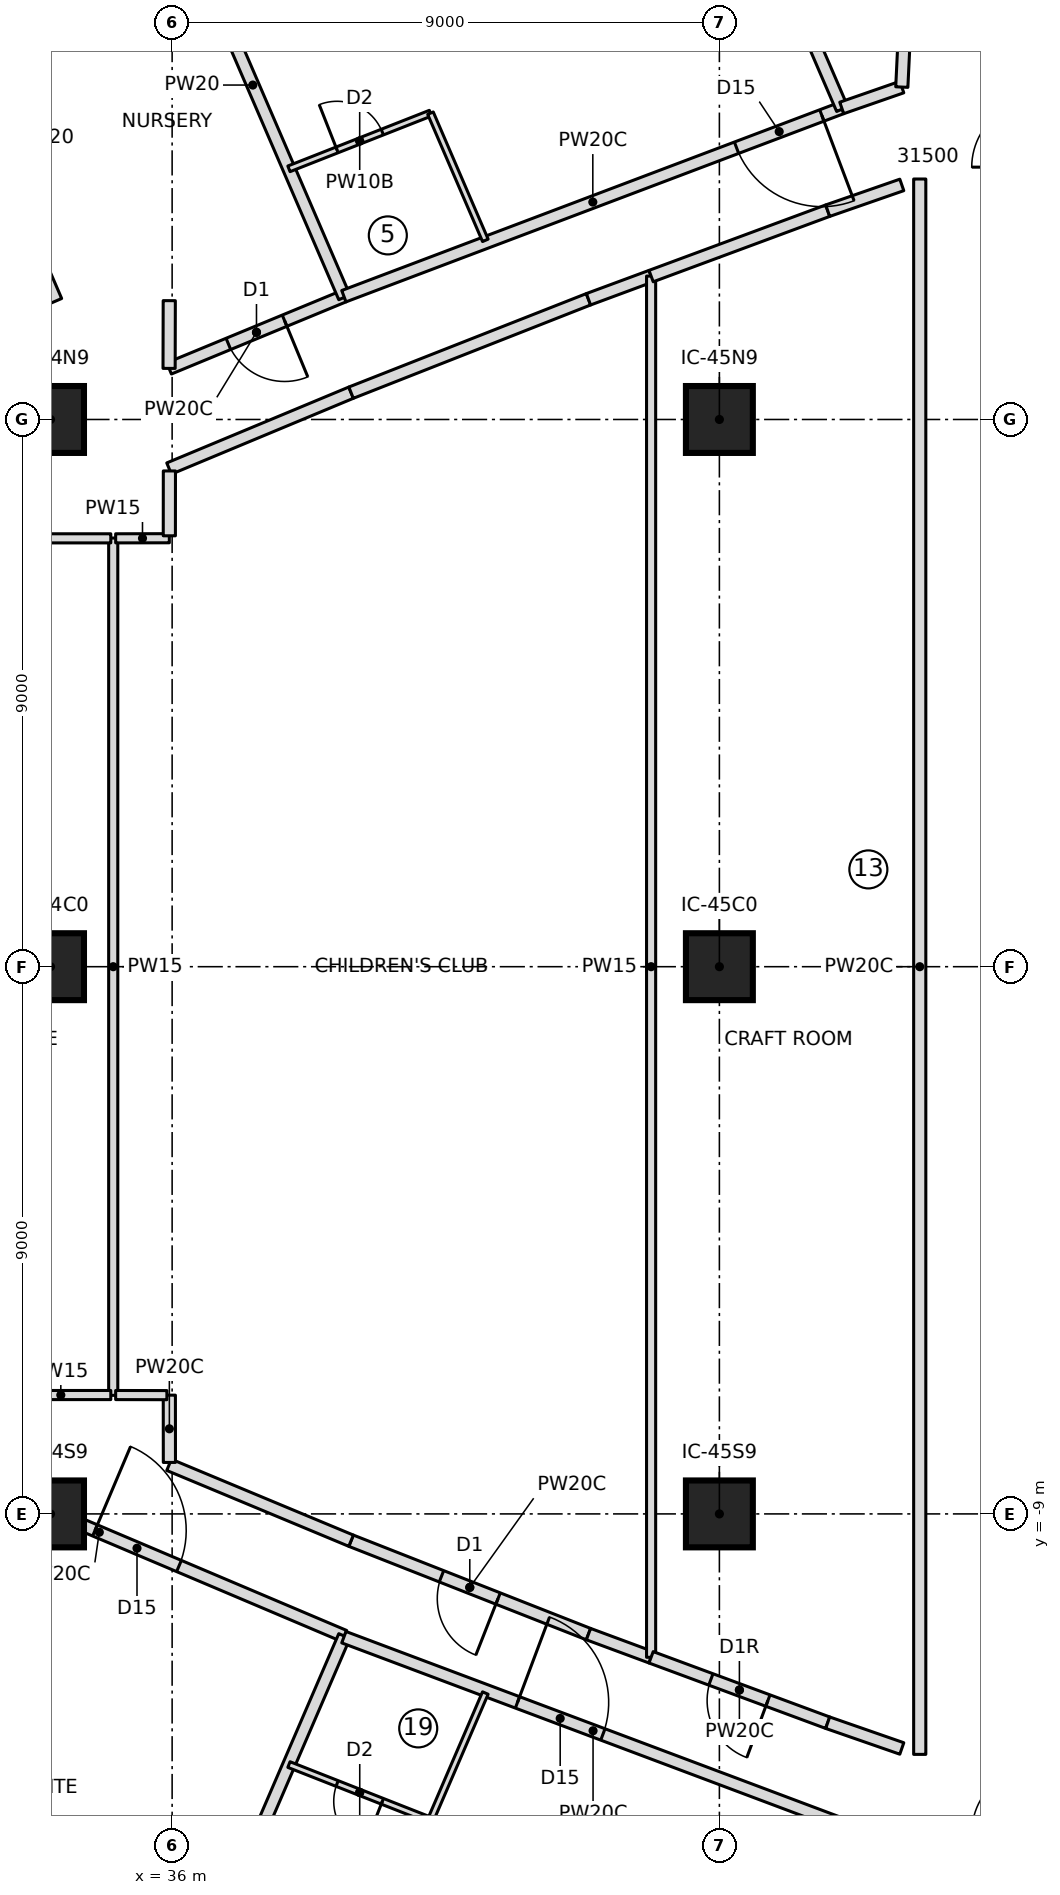
"""IFC4 building model, lengths in metres.
Left out: names, types, materials, properties, quantities, classifications, styles, units other than length and angle.
Written with IfcOpenShell. Run it as: python <this file> out.ifc"""

import sys

from ifc_helpers import new_model, si_unit, direction, frame, frame_2d, origin, origin_2d, place, context, subcontext, project, spatial, rectangle, extrude, element, fill, save


model = new_model("IFC4")
c1 = context("Model", 3, precision=1e-05, world=origin(), true_north=direction((0.0, 1.0)))
c2 = subcontext(c1, "Body", "Model", "MODEL_VIEW")
j1 = project(units=[si_unit("LENGTHUNIT", "METRE"), si_unit("PLANEANGLEUNIT", "RADIAN")], contexts=[c1])
p1 = place(None, origin())
s1 = spatial("IfcSite", under=j1, at=p1, CompositionType="ELEMENT")
p2 = place(p1, origin())
s2 = spatial("IfcBuilding", under=s1, at=p2, CompositionType="ELEMENT")
p3 = place(p2, frame((0.0, 0.0, 155.05)))
s3 = spatial("IfcBuildingStorey", under=s2, at=p3, CompositionType="ELEMENT", Elevation=155.05)
for number, where, z_axis, x_axis in (
    (1, (34.0, -9.0, 0.0), (0.0, 0.0, 1.0), (1.0, 0.0, 0.0)),
    (2, (34.0, 0.0, 0.0), (0.0, 0.0, 1.0), (1.0, 0.0, 0.0)),
    (3, (34.0, 9.0, 0.0), (0.0, 0.0, 1.0), (1.0, 0.0, 0.0)),
    (4, (45.0, -9.0, 0.0), (0.0, 0.0, 1.0), (1.0, 0.0, 0.0)),
    (5, (45.0, 0.0, 0.0), (0.0, 0.0, 1.0), (1.0, 0.0, 0.0)),
    (6, (45.0, 9.0, 0.0), (0.0, 0.0, 1.0), (1.0, 0.0, 0.0)),
):
    element("IfcColumn", number, at=place(p3, frame(where, z_axis=z_axis, x_axis=x_axis)), inside=s3, PredefinedType="COLUMN", context=c2, shape_type="SweptSolid", body=[
        extrude(rectangle(XDim=1.1, YDim=1.1, at=origin_2d()), origin(), (0.0, 0.0, 1.0), 3.55),
    ])
p4 = place(p3, frame((34.092, 10.95, 0.0), z_axis=(0.0, 0.0, 1.0), x_axis=(-0.395991607501, 0.918254129742, 0.0)))
e7 = element("IfcWall", 7, at=p4, inside=s3, PredefinedType="PARTITIONING", context=c2, shape_type="SweptSolid", body=[
    extrude(rectangle(XDim=5.841, YDim=0.2, at=frame_2d((2.92, 0.0))), origin(), (0.0, 0.0, 1.0), 3.25),
])
p5 = place(p3, frame((38.824, 11.028, 0.0), z_axis=(0.0, 0.0, 1.0), x_axis=(-0.924238544028, -0.381815549359, 0.0)))
e8 = element("IfcWall", 8, at=p5, inside=s3, PredefinedType="PARTITIONING", context=c2, shape_type="SweptSolid", body=[
    extrude(rectangle(XDim=3.11, YDim=0.2, at=frame_2d((1.555, 0.0))), origin(), (0.0, 0.0, 1.0), 3.25),
])
p6 = place(p5, frame((1.055, 0.0, 0.0)))
e9 = element("IfcOpeningElement", 9, at=p6, cuts=e8, PredefinedType="OPENING", context=c2, shape_type="SweptSolid", body=[
    extrude(rectangle(XDim=1.0, YDim=2.1, at=frame_2d((0.5, 1.05))), frame((0.0, 0.11, 0.0), z_axis=(0.0, -1.0, 0.0), x_axis=(1.0, 0.0, 0.0)), (0.0, 0.0, 1.0), 0.22),
])
p7 = place(p3, frame((38.832, 11.009, 0.0), z_axis=(0.0, 0.0, 1.0), x_axis=(-0.395987603644, 0.918255856371, 0.0)))
e10 = element("IfcWall", 10, at=p7, inside=s3, PredefinedType="PARTITIONING", context=c2, shape_type="SweptSolid", body=[
    extrude(rectangle(XDim=7.604, YDim=0.2, at=frame_2d((3.802, 0.0))), origin(), (0.0, 0.0, 1.0), 3.25),
])
p8 = place(p3, frame((47.012, 14.124, 0.0), z_axis=(0.0, 0.0, 1.0), x_axis=(-0.935360585256, -0.353695597299, 0.0)))
e11 = element("IfcWall", 11, at=p8, inside=s3, PredefinedType="PARTITIONING", context=c2, shape_type="SweptSolid", body=[
    extrude(rectangle(XDim=8.754, YDim=0.2, at=frame_2d((4.377, 0.0))), origin(), (0.0, 0.0, 1.0), 3.25),
])
p9 = place(p8, frame((0.35, 0.0, 0.0)))
e12 = element("IfcOpeningElement", 12, at=p9, cuts=e11, PredefinedType="OPENING", context=c2, shape_type="SweptSolid", body=[
    extrude(rectangle(XDim=1.5, YDim=2.1, at=frame_2d((0.75, 1.05))), frame((0.0, 0.11, 0.0), z_axis=(0.0, -1.0, 0.0), x_axis=(1.0, 0.0, 0.0)), (0.0, 0.0, 1.0), 0.22),
])
p10 = place(p3, frame((37.921, 13.122, 0.0), z_axis=(0.0, 0.0, 1.0), x_axis=(0.930555592459, 0.366150637503, 0.0)))
e13 = element("IfcWall", 13, at=p10, inside=s3, PredefinedType="PARTITIONING", context=c2, shape_type="SweptSolid", body=[
    extrude(rectangle(XDim=2.501, YDim=0.1, at=frame_2d((1.25, 0.0))), origin(), (0.0, 0.0, 1.0), 3.25),
])
p11 = place(p10, frame((0.85, 0.0, 0.0)))
e14 = element("IfcOpeningElement", 14, at=p11, cuts=e13, PredefinedType="OPENING", context=c2, shape_type="SweptSolid", body=[
    extrude(rectangle(XDim=0.8, YDim=2.1, at=frame_2d((0.4, 1.05))), frame((0.0, 0.06, 0.0), z_axis=(0.0, -1.0, 0.0), x_axis=(1.0, 0.0, 0.0)), (0.0, 0.0, 1.0), 0.12),
])
p12 = place(p3, frame((40.249, 14.038, 0.0), z_axis=(0.0, 0.0, 1.0), x_axis=(0.39596178423, -0.918266990275, 0.0)))
e15 = element("IfcWall", 15, at=p12, inside=s3, PredefinedType="PARTITIONING", context=c2, shape_type="SweptSolid", body=[
    extrude(rectangle(XDim=2.278, YDim=0.1, at=frame_2d((1.139, 0.0))), origin(), (0.0, 0.0, 1.0), 3.25),
])
p13 = place(p3, frame((47.021, 14.105, 0.0), z_axis=(0.0, 0.0, 1.0), x_axis=(-0.39600636385, 0.918247766014, 0.0)))
e16 = element("IfcWall", 16, at=p13, inside=s3, PredefinedType="PARTITIONING", context=c2, shape_type="SweptSolid", body=[
    extrude(rectangle(XDim=7.62, YDim=0.2, at=frame_2d((3.81, 0.0))), origin(), (0.0, 0.0, 1.0), 3.25),
])
p14 = place(p3, frame((30.772, -7.594, 0.0), z_axis=(0.0, 0.0, 1.0), x_axis=(0.920747305421, -0.390159454019, 0.0)))
e17 = element("IfcWall", 17, at=p14, inside=s3, PredefinedType="PARTITIONING", context=c2, shape_type="SweptSolid", body=[
    extrude(rectangle(XDim=8.754, YDim=0.2, at=frame_2d((4.377, 0.0))), origin(), (0.0, 0.0, 1.0), 3.25),
])
p15 = place(p14, frame((4.3, 0.0, 0.0)))
e18 = element("IfcOpeningElement", 18, at=p15, cuts=e17, PredefinedType="OPENING", context=c2, shape_type="SweptSolid", body=[
    extrude(rectangle(XDim=1.5, YDim=2.1, at=frame_2d((0.75, 1.05))), frame((0.0, 0.11, 0.0), z_axis=(0.0, -1.0, 0.0), x_axis=(1.0, 0.0, 0.0)), (0.0, 0.0, 1.0), 0.22),
])
p16 = place(p3, frame((35.821, -17.991, 0.0), z_axis=(0.0, 0.0, 1.0), x_axis=(0.395987603644, 0.918255856371, 0.0)))
e19 = element("IfcWall", 19, at=p16, inside=s3, PredefinedType="PARTITIONING", context=c2, shape_type="SweptSolid", body=[
    extrude(rectangle(XDim=7.604, YDim=0.2, at=frame_2d((3.802, 0.0))), origin(), (0.0, 0.0, 1.0), 3.25),
])
p17 = place(p3, frame((38.824, -11.028, 0.0), z_axis=(0.0, 0.0, 1.0), x_axis=(0.936174374451, -0.351535973439, 0.0)))
e20 = element("IfcWall", 20, at=p17, inside=s3, PredefinedType="PARTITIONING", context=c2, shape_type="SweptSolid", body=[
    extrude(rectangle(XDim=8.755, YDim=0.2, at=frame_2d((4.377, 0.0))), origin(), (0.0, 0.0, 1.0), 3.25),
])
p18 = place(p17, frame((3.05, 0.0, 0.0)))
e21 = element("IfcOpeningElement", 21, at=p18, cuts=e20, PredefinedType="OPENING", context=c2, shape_type="SweptSolid", body=[
    extrude(rectangle(XDim=1.5, YDim=2.1, at=frame_2d((0.75, 1.05))), frame((0.0, 0.11, 0.0), z_axis=(0.0, -1.0, 0.0), x_axis=(1.0, 0.0, 0.0)), (0.0, 0.0, 1.0), 0.22),
])
p19 = place(p3, frame((41.151, -11.946, 0.0), z_axis=(0.0, 0.0, 1.0), x_axis=(-0.39596178423, -0.918266990275, 0.0)))
e22 = element("IfcWall", 22, at=p19, inside=s3, PredefinedType="PARTITIONING", context=c2, shape_type="SweptSolid", body=[
    extrude(rectangle(XDim=2.278, YDim=0.1, at=frame_2d((1.139, 0.0))), origin(), (0.0, 0.0, 1.0), 3.25),
])
p20 = place(p3, frame((40.249, -14.038, 0.0), z_axis=(0.0, 0.0, 1.0), x_axis=(-0.930555592459, 0.366150637503, 0.0)))
e23 = element("IfcWall", 23, at=p20, inside=s3, PredefinedType="PARTITIONING", context=c2, shape_type="SweptSolid", body=[
    extrude(rectangle(XDim=2.501, YDim=0.1, at=frame_2d((1.25, 0.0))), origin(), (0.0, 0.0, 1.0), 3.25),
])
p21 = place(p20, frame((0.85, 0.0, 0.0)))
e24 = element("IfcOpeningElement", 24, at=p21, cuts=e23, PredefinedType="OPENING", context=c2, shape_type="SweptSolid", body=[
    extrude(rectangle(XDim=0.8, YDim=2.1, at=frame_2d((0.4, 1.05))), frame((0.0, 0.06, 0.0), z_axis=(0.0, -1.0, 0.0), x_axis=(1.0, 0.0, 0.0)), (0.0, 0.0, 1.0), 0.12),
])
p22 = place(p3, frame((35.031, -7.05, 0.0), z_axis=(0.0, 0.0, 1.0), x_axis=(0.0, 1.0, 0.0)))
e25 = element("IfcWall", 25, at=p22, inside=s3, PredefinedType="PARTITIONING", context=c2, shape_type="SweptSolid", body=[
    extrude(rectangle(XDim=14.1, YDim=0.15, at=frame_2d((7.05, 0.0))), origin(), (0.0, 0.0, 1.0), 3.25),
])
p23 = place(p3, frame((42.847, -10.977, 0.0), z_axis=(0.0, 0.0, 1.0), x_axis=(-0.930576677263, 0.36609704688, 0.0)))
e26 = element("IfcWall", 26, at=p23, inside=s3, PredefinedType="PARTITIONING", context=c2, shape_type="SweptSolid", body=[
    extrude(rectangle(XDim=4.195, YDim=0.2, at=frame_2d((2.098, 0.0))), origin(), (0.0, 0.0, 1.0), 3.25),
])
p24 = place(p23, frame((1.598, 0.0, 0.0)))
e27 = element("IfcOpeningElement", 27, at=p24, cuts=e26, PredefinedType="OPENING", context=c2, shape_type="SweptSolid", body=[
    extrude(rectangle(XDim=1.0, YDim=2.1, at=frame_2d((0.5, 1.05))), frame((0.0, 0.11, 0.0), z_axis=(0.0, -1.0, 0.0), x_axis=(1.0, 0.0, 0.0)), (0.0, 0.0, 1.0), 0.22),
])
p25 = place(p3, frame((35.95, 8.193, 0.0), z_axis=(0.0, 0.0, 1.0), x_axis=(0.923005630596, 0.384786441923, 0.0)))
e28 = element("IfcWall", 28, at=p25, inside=s3, PredefinedType="PARTITIONING", context=c2, shape_type="SweptSolid", body=[
    extrude(rectangle(XDim=3.243, YDim=0.2, at=frame_2d((1.622, 0.0))), origin(), (0.0, 0.0, 1.0), 3.25),
])
p26 = place(p3, frame((38.943, 9.441, 0.0), z_axis=(0.0, 0.0, 1.0), x_axis=(0.930576677263, 0.36609704688, 0.0)))
e29 = element("IfcWall", 29, at=p26, inside=s3, PredefinedType="PARTITIONING", context=c2, shape_type="SweptSolid", body=[
    extrude(rectangle(XDim=4.195, YDim=0.2, at=frame_2d((2.098, 0.0))), origin(), (0.0, 0.0, 1.0), 3.25),
])
for number, where, z_axis, x_axis in (
    (30, (42.847, 10.977, 0.0), (0.0, 0.0, 1.0), (0.938, 0.347, 0.0)),
    (31, (43.877, -11.358, 0.0), (0.0, 0.0, 1.0), (-0.938, 0.347, 0.0)),
):
    element("IfcWall", number, at=place(p3, frame(where, z_axis=z_axis, x_axis=x_axis)), inside=s3, PredefinedType="PARTITIONING", context=c2, shape_type="SweptSolid", body=[
        extrude(rectangle(XDim=1.098, YDim=0.2, at=frame_2d((0.549, 0.0))), origin(), (0.0, 0.0, 1.0), 3.25),
    ])
p27 = place(p3, frame((38.943, -9.441, 0.0), z_axis=(0.0, 0.0, 1.0), x_axis=(-0.923005630596, 0.384786441923, 0.0)))
e32 = element("IfcWall", 32, at=p27, inside=s3, PredefinedType="PARTITIONING", context=c2, shape_type="SweptSolid", body=[
    extrude(rectangle(XDim=3.243, YDim=0.2, at=frame_2d((1.622, 0.0))), origin(), (0.0, 0.0, 1.0), 3.25),
])
p28 = place(p3, frame((43.877, -11.358, 0.0), z_axis=(0.0, 0.0, 1.0), x_axis=(0.0, 1.0, 0.0)))
e33 = element("IfcWall", 33, at=p28, inside=s3, PredefinedType="PARTITIONING", context=c2, shape_type="SweptSolid", body=[
    extrude(rectangle(XDim=22.717, YDim=0.15, at=frame_2d((11.358, 0.0))), origin(), (0.0, 0.0, 1.0), 3.25),
])
p29 = place(p3, frame((46.781, -12.434, 0.0), z_axis=(0.0, 0.0, 1.0), x_axis=(-0.937737348698, 0.347345166739, 0.0)))
e34 = element("IfcWall", 34, at=p29, inside=s3, PredefinedType="PARTITIONING", context=c2, shape_type="SweptSolid", body=[
    extrude(rectangle(XDim=3.097, YDim=0.2, at=frame_2d((1.548, 0.0))), origin(), (0.0, 0.0, 1.0), 3.25),
])
p30 = place(p29, frame((1.049, 0.0, 0.0)))
e35 = element("IfcOpeningElement", 35, at=p30, cuts=e34, PredefinedType="OPENING", context=c2, shape_type="SweptSolid", body=[
    extrude(rectangle(XDim=1.0, YDim=2.1, at=frame_2d((0.5, 1.05))), frame((0.0, 0.11, 0.0), z_axis=(0.0, -1.0, 0.0), x_axis=(1.0, 0.0, 0.0)), (0.0, 0.0, 1.0), 0.22),
])
p31 = place(p3, frame((43.877, 11.358, 0.0), z_axis=(0.0, 0.0, 1.0), x_axis=(0.937737348698, 0.347345166739, 0.0)))
e36 = element("IfcWall", 36, at=p31, inside=s3, PredefinedType="PARTITIONING", context=c2, shape_type="SweptSolid", body=[
    extrude(rectangle(XDim=3.097, YDim=0.2, at=frame_2d((1.548, 0.0))), origin(), (0.0, 0.0, 1.0), 3.25),
])
p32 = place(p3, frame((48.0, 14.467, 0.0), z_axis=(0.0, 0.0, 1.0), x_axis=(-0.944566081842, -0.32832136244, 0.0)))
e37 = element("IfcWall", 37, at=p32, inside=s3, PredefinedType="PARTITIONING", context=c2, shape_type="SweptSolid", body=[
    extrude(rectangle(XDim=1.045, YDim=0.2, at=frame_2d((0.523, 0.0))), origin(), (0.0, 0.0, 1.0), 3.25),
])
for number, where, z_axis, x_axis in (
    (38, (46.781, 12.434, 0.0), (0.0, 0.0, 1.0), (0.945, 0.328, 0.0)),
    (39, (48.0, -12.858, 0.0), (0.0, 0.0, 1.0), (-0.945, 0.328, 0.0)),
):
    element("IfcWall", number, at=place(p3, frame(where, z_axis=z_axis, x_axis=x_axis)), inside=s3, PredefinedType="PARTITIONING", context=c2, shape_type="SweptSolid", body=[
        extrude(rectangle(XDim=1.29, YDim=0.2, at=frame_2d((0.645, 0.0))), origin(), (0.0, 0.0, 1.0), 3.25),
    ])
p33 = place(p3, frame((48.279, 20.289, 0.0), z_axis=(0.0, 0.0, 1.0), x_axis=(-0.047837808481, -0.998855116661, 0.0)))
e40 = element("IfcWall", 40, at=p33, inside=s3, PredefinedType="PARTITIONING", context=c2, shape_type="SweptSolid", body=[
    extrude(rectangle(XDim=5.828, YDim=0.2, at=frame_2d((2.914, 0.0))), origin(), (0.0, 0.0, 1.0), 3.25),
])
p34 = place(p33, frame((2.414, 0.0, 0.0)))
e41 = element("IfcOpeningElement", 41, at=p34, cuts=e40, PredefinedType="OPENING", context=c2, shape_type="SweptSolid", body=[
    extrude(rectangle(XDim=1.5, YDim=2.1, at=frame_2d((0.75, 1.05))), frame((0.0, 0.11, 0.0), z_axis=(0.0, -1.0, 0.0), x_axis=(1.0, 0.0, 0.0)), (0.0, 0.0, 1.0), 0.22),
])
for number, where, z_axis, x_axis in (
    (42, (34.991, -7.045, 0.0), (0.0, 0.0, 1.0), (-1.0, 0.0, 0.0)),
    (43, (33.347, 7.045, 0.0), (0.0, 0.0, 1.0), (1.0, 0.0, 0.0)),
):
    element("IfcWall", number, at=place(p3, frame(where, z_axis=z_axis, x_axis=x_axis)), inside=s3, PredefinedType="PARTITIONING", context=c2, shape_type="SweptSolid", body=[
        extrude(rectangle(XDim=1.644, YDim=0.15, at=frame_2d((0.822, 0.0))), origin(), (0.0, 0.0, 1.0), 3.25),
    ])
p35 = place(p3, frame((35.955, -8.154, 0.0), z_axis=(0.0, 0.0, 1.0), x_axis=(-0.00110302161, 0.999999391671, 0.0)))
e44 = element("IfcWall", 44, at=p35, inside=s3, PredefinedType="PARTITIONING", context=c2, shape_type="SweptSolid", body=[
    extrude(rectangle(XDim=1.107, YDim=0.2, at=frame_2d((0.553, 0.0))), origin(), (0.0, 0.0, 1.0), 3.25),
])
p36 = place(p3, frame((35.914, -7.047, 0.0), z_axis=(0.0, 0.0, 1.0), x_axis=(-0.999998488592, 0.001738623857, 0.0)))
e45 = element("IfcWall", 45, at=p36, inside=s3, PredefinedType="PARTITIONING", context=c2, shape_type="SweptSolid", body=[
    extrude(rectangle(XDim=0.843, YDim=0.15, at=frame_2d((0.421, 0.0))), origin(), (0.0, 0.0, 1.0), 3.25),
])
p37 = place(p3, frame((35.071, 7.045, 0.0), z_axis=(0.0, 0.0, 1.0), x_axis=(0.999998125229, 0.00193637258, 0.0)))
e46 = element("IfcWall", 46, at=p37, inside=s3, PredefinedType="PARTITIONING", context=c2, shape_type="SweptSolid", body=[
    extrude(rectangle(XDim=0.883, YDim=0.15, at=frame_2d((0.441, 0.0))), origin(), (0.0, 0.0, 1.0), 3.25),
])
p38 = place(p3, frame((35.954, 7.087, 0.0), z_axis=(0.0, 0.0, 1.0), x_axis=(0.001144425893, 0.999999345144, 0.0)))
e47 = element("IfcWall", 47, at=p38, inside=s3, PredefinedType="PARTITIONING", context=c2, shape_type="SweptSolid", body=[
    extrude(rectangle(XDim=1.067, YDim=0.2, at=frame_2d((0.533, 0.0))), origin(), (0.0, 0.0, 1.0), 3.25),
])
p39 = place(p3, frame((48.295, 12.955, 0.0), z_axis=(0.0, 0.0, 1.0), x_axis=(0.0, -1.0, 0.0)))
e48 = element("IfcWall", 48, at=p39, inside=s3, PredefinedType="PARTITIONING", context=c2, shape_type="SweptSolid", body=[
    extrude(rectangle(XDim=25.91, YDim=0.2, at=frame_2d((12.955, 0.0))), origin(), (0.0, 0.0, 1.0), 3.25),
])
p40 = place(p3, frame((35.95, 9.84, 0.0), z_axis=(0.0, 0.0, 1.0), x_axis=(0.00262983969, 0.999996541966, 0.0)))
e49 = element("IfcWall", 49, at=p40, inside=s3, PredefinedType="PARTITIONING", context=c2, shape_type="SweptSolid", body=[
    extrude(rectangle(XDim=1.114, YDim=0.2, at=frame_2d((0.557, 0.0))), origin(), (0.0, 0.0, 1.0), 3.25),
])
p41 = place(p6, origin())
e50 = element("IfcDoor", 50, at=p41, inside=s3, OperationType="SINGLE_SWING_LEFT", PredefinedType="DOOR", context=c2, shape_type="SweptSolid", body=[
    extrude(rectangle(XDim=1.0, YDim=2.1, at=frame_2d((0.5, 1.05))), frame((0.0, 0.025, 0.0), z_axis=(0.0, -1.0, 0.0), x_axis=(1.0, 0.0, 0.0)), (0.0, 0.0, 1.0), 0.05),
])
fill(e9, e50)
p42 = place(p11, origin())
e51 = element("IfcDoor", 51, at=p42, inside=s3, OperationType="SINGLE_SWING_LEFT", PredefinedType="DOOR", context=c2, shape_type="SweptSolid", body=[
    extrude(rectangle(XDim=0.8, YDim=2.1, at=frame_2d((0.4, 1.05))), frame((0.0, 0.025, 0.0), z_axis=(0.0, -1.0, 0.0), x_axis=(1.0, 0.0, 0.0)), (0.0, 0.0, 1.0), 0.05),
])
fill(e14, e51)
p43 = place(p9, origin())
e52 = element("IfcDoor", 52, at=p43, inside=s3, OperationType="DOUBLE_DOOR_SINGLE_SWING", PredefinedType="DOOR", context=c2, shape_type="SweptSolid", body=[
    extrude(rectangle(XDim=1.5, YDim=2.1, at=frame_2d((0.75, 1.05))), frame((0.0, 0.025, 0.0), z_axis=(0.0, -1.0, 0.0), x_axis=(1.0, 0.0, 0.0)), (0.0, 0.0, 1.0), 0.05),
])
fill(e12, e52)
p44 = place(p15, origin())
e53 = element("IfcDoor", 53, at=p44, inside=s3, OperationType="DOUBLE_DOOR_SINGLE_SWING", PredefinedType="DOOR", context=c2, shape_type="SweptSolid", body=[
    extrude(rectangle(XDim=1.5, YDim=2.1, at=frame_2d((0.75, 1.05))), frame((0.0, 0.025, 0.0), z_axis=(0.0, -1.0, 0.0), x_axis=(1.0, 0.0, 0.0)), (0.0, 0.0, 1.0), 0.05),
])
fill(e18, e53)
p45 = place(p21, origin())
e54 = element("IfcDoor", 54, at=p45, inside=s3, OperationType="SINGLE_SWING_LEFT", PredefinedType="DOOR", context=c2, shape_type="SweptSolid", body=[
    extrude(rectangle(XDim=0.8, YDim=2.1, at=frame_2d((0.4, 1.05))), frame((0.0, 0.025, 0.0), z_axis=(0.0, -1.0, 0.0), x_axis=(1.0, 0.0, 0.0)), (0.0, 0.0, 1.0), 0.05),
])
fill(e24, e54)
p46 = place(p18, origin())
e55 = element("IfcDoor", 55, at=p46, inside=s3, OperationType="DOUBLE_DOOR_SINGLE_SWING", PredefinedType="DOOR", context=c2, shape_type="SweptSolid", body=[
    extrude(rectangle(XDim=1.5, YDim=2.1, at=frame_2d((0.75, 1.05))), frame((0.0, 0.025, 0.0), z_axis=(0.0, -1.0, 0.0), x_axis=(1.0, 0.0, 0.0)), (0.0, 0.0, 1.0), 0.05),
])
fill(e21, e55)
p47 = place(p24, origin())
e56 = element("IfcDoor", 56, at=p47, inside=s3, OperationType="SINGLE_SWING_LEFT", PredefinedType="DOOR", context=c2, shape_type="SweptSolid", body=[
    extrude(rectangle(XDim=1.0, YDim=2.1, at=frame_2d((0.5, 1.05))), frame((0.0, 0.025, 0.0), z_axis=(0.0, -1.0, 0.0), x_axis=(1.0, 0.0, 0.0)), (0.0, 0.0, 1.0), 0.05),
])
fill(e27, e56)
p48 = place(p30, origin())
e57 = element("IfcDoor", 57, at=p48, inside=s3, OperationType="SINGLE_SWING_RIGHT", PredefinedType="DOOR", context=c2, shape_type="SweptSolid", body=[
    extrude(rectangle(XDim=1.0, YDim=2.1, at=frame_2d((0.5, 1.05))), frame((0.0, 0.025, 0.0), z_axis=(0.0, -1.0, 0.0), x_axis=(1.0, 0.0, 0.0)), (0.0, 0.0, 1.0), 0.05),
])
fill(e35, e57)
save(model, sys.argv[1])
